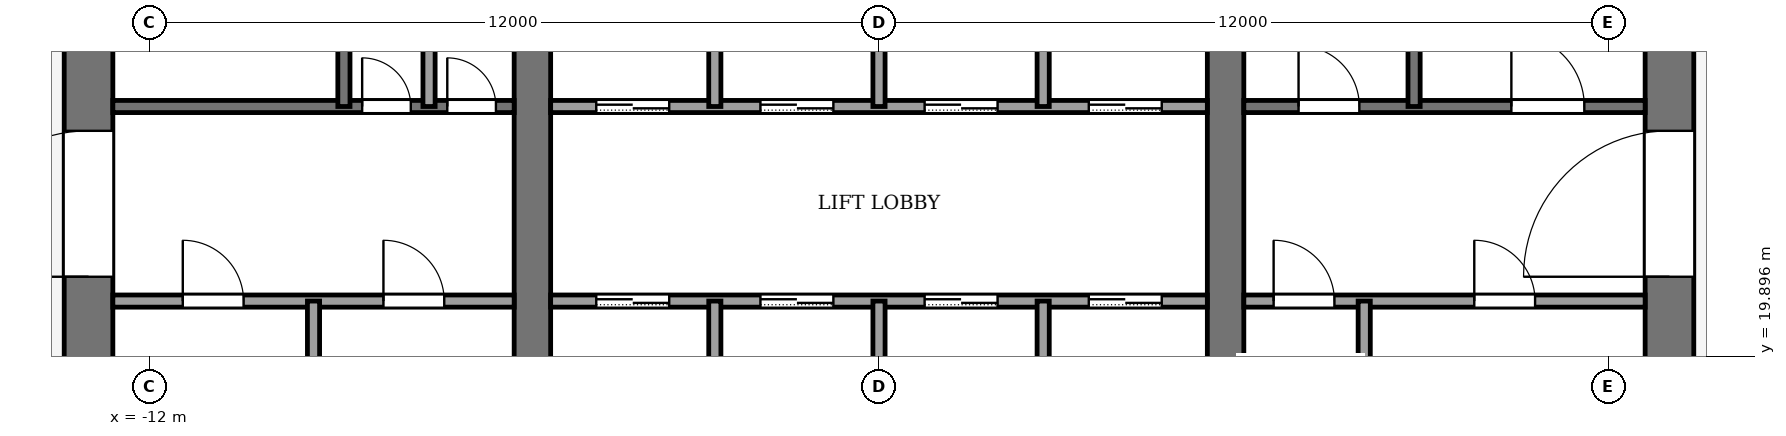
"""IFC4 building model, lengths in metres.
Left out: names, types, materials, properties, quantities, classifications, styles, units other than length and angle.
Written with IfcOpenShell. Run it as: python <this file> out.ifc"""

import sys

from ifc_helpers import new_model, si_unit, direction, frame, frame_2d, origin, place, context, subcontext, project, spatial, rectangle, extrude, element, fill, save


model = new_model("IFC4")
c1 = context("Model", 3, precision=1e-05, world=origin(), true_north=direction((0.0, 1.0)))
c2 = subcontext(c1, "Body", "Model", "MODEL_VIEW")
j1 = project(units=[si_unit("LENGTHUNIT", "METRE"), si_unit("PLANEANGLEUNIT", "RADIAN")], contexts=[c1])
p1 = place(None, origin())
s1 = spatial("IfcSite", under=j1, at=p1, CompositionType="ELEMENT")
p2 = place(p1, origin())
s2 = spatial("IfcBuilding", under=s1, at=p2, CompositionType="ELEMENT")
p3 = place(p2, frame((0.0, 0.0, 246.0)))
s3 = spatial("IfcBuildingStorey", under=s2, at=p3, CompositionType="ELEMENT", Elevation=246.0)
p4 = place(p3, frame((-13.0, 18.4, -0.13), z_axis=(0.0, 0.0, 1.0), x_axis=(0.0, 1.0, 0.0)))
e1 = element("IfcWall", 1, at=p4, inside=s3, PredefinedType="SHEAR", context=c2, shape_type="SweptSolid", body=[
    extrude(rectangle(XDim=19.2, YDim=0.8, at=frame_2d((9.6, 0.0))), origin(), (0.0, 0.0, 1.0), 4.0),
])
p5 = place(p4, frame((2.8, 0.0, 0.13)))
e2 = element("IfcOpeningElement", 2, at=p5, cuts=e1, PredefinedType="OPENING", context=c2, shape_type="SweptSolid", body=[
    extrude(rectangle(XDim=2.4, YDim=2.4, at=frame_2d((1.2, 1.2))), frame((0.0, 0.41, 0.0), z_axis=(0.0, -1.0, 0.0), x_axis=(1.0, 0.0, 0.0)), (0.0, 0.0, 1.0), 0.82),
])
p6 = place(p4, frame((13.4, 0.0, 0.13)))
e3 = element("IfcOpeningElement", 3, at=p6, cuts=e1, PredefinedType="OPENING", context=c2, shape_type="SweptSolid", body=[
    extrude(rectangle(XDim=1.4, YDim=2.2, at=frame_2d((0.7, 1.1))), frame((0.0, 0.41, 0.0), z_axis=(0.0, -1.0, 0.0), x_axis=(1.0, 0.0, 0.0)), (0.0, 0.0, 1.0), 0.82),
])
p7 = place(p3, frame((13.0, 18.4, -0.13), z_axis=(0.0, 0.0, 1.0), x_axis=(0.0, 1.0, 0.0)))
e4 = element("IfcWall", 4, at=p7, inside=s3, PredefinedType="SHEAR", context=c2, shape_type="SweptSolid", body=[
    extrude(rectangle(XDim=19.2, YDim=0.8, at=frame_2d((9.6, 0.0))), origin(), (0.0, 0.0, 1.0), 4.0),
])
p8 = place(p7, frame((2.8, 0.0, 0.13)))
e5 = element("IfcOpeningElement", 5, at=p8, cuts=e4, PredefinedType="OPENING", context=c2, shape_type="SweptSolid", body=[
    extrude(rectangle(XDim=2.4, YDim=2.4, at=frame_2d((1.2, 1.2))), frame((0.0, 0.41, 0.0), z_axis=(0.0, -1.0, 0.0), x_axis=(1.0, 0.0, 0.0)), (0.0, 0.0, 1.0), 0.82),
])
p9 = place(p7, frame((13.3, 0.0, 0.13)))
e6 = element("IfcOpeningElement", 6, at=p9, cuts=e4, PredefinedType="OPENING", context=c2, shape_type="SweptSolid", body=[
    extrude(rectangle(XDim=2.4, YDim=2.4, at=frame_2d((1.2, 1.2))), frame((0.0, 0.41, 0.0), z_axis=(0.0, -1.0, 0.0), x_axis=(1.0, 0.0, 0.0)), (0.0, 0.0, 1.0), 0.82),
])
p10 = place(p3, frame((-5.7, 18.4, -0.13), z_axis=(0.0, 0.0, 1.0), x_axis=(0.0, 1.0, 0.0)))
e7 = element("IfcWall", 7, at=p10, inside=s3, PredefinedType="SHEAR", context=c2, shape_type="SweptSolid", body=[
    extrude(rectangle(XDim=19.2, YDim=0.6, at=frame_2d((9.6, 0.0))), origin(), (0.0, 0.0, 1.0), 4.0),
])
p11 = place(p10, frame((8.35, 0.0, 0.13)))
e8 = element("IfcOpeningElement", 8, at=p11, cuts=e7, PredefinedType="OPENING", context=c2, shape_type="SweptSolid", body=[
    extrude(rectangle(XDim=0.9, YDim=2.1, at=frame_2d((0.45, 1.05))), frame((0.0, 0.31, 0.0), z_axis=(0.0, -1.0, 0.0), x_axis=(1.0, 0.0, 0.0)), (0.0, 0.0, 1.0), 0.62),
])
p12 = place(p3, frame((5.7, 18.4, -0.13), z_axis=(0.0, 0.0, 1.0), x_axis=(0.0, 1.0, 0.0)))
e9 = element("IfcWall", 9, at=p12, inside=s3, PredefinedType="SHEAR", context=c2, shape_type="SweptSolid", body=[
    extrude(rectangle(XDim=19.2, YDim=0.6, at=frame_2d((9.6, 0.0))), origin(), (0.0, 0.0, 1.0), 4.0),
])
p13 = place(p12, frame((8.35, 0.0, 0.13)))
e10 = element("IfcOpeningElement", 10, at=p13, cuts=e9, PredefinedType="OPENING", context=c2, shape_type="SweptSolid", body=[
    extrude(rectangle(XDim=0.9, YDim=2.1, at=frame_2d((0.45, 1.05))), frame((0.0, 0.31, 0.0), z_axis=(0.0, -1.0, 0.0), x_axis=(1.0, 0.0, 0.0)), (0.0, 0.0, 1.0), 0.62),
])
p14 = place(p12, frame((13.3, 0.0, 0.13)))
e11 = element("IfcOpeningElement", 11, at=p14, cuts=e9, PredefinedType="OPENING", context=c2, shape_type="SweptSolid", body=[
    extrude(rectangle(XDim=2.4, YDim=2.4, at=frame_2d((1.2, 1.2))), frame((0.0, 0.31, 0.0), z_axis=(0.0, -1.0, 0.0), x_axis=(1.0, 0.0, 0.0)), (0.0, 0.0, 1.0), 0.62),
])
p15 = place(p3, frame((-12.6, 20.8, 0.0), z_axis=(0.0, 0.0, 1.0), x_axis=(1.0, 0.0, 0.0)))
e12 = element("IfcWall", 12, at=p15, inside=s3, PredefinedType="PARTITIONING", context=c2, shape_type="SweptSolid", body=[
    extrude(rectangle(XDim=6.6, YDim=0.2, at=frame_2d((3.3, 0.0))), origin(), (0.0, 0.0, 1.0), 3.87),
])
p16 = place(p15, frame((1.15, 0.0, 0.0)))
e13 = element("IfcOpeningElement", 13, at=p16, cuts=e12, PredefinedType="OPENING", context=c2, shape_type="SweptSolid", body=[
    extrude(rectangle(XDim=1.0, YDim=2.1, at=frame_2d((0.5, 1.05))), frame((0.0, 0.11, 0.0), z_axis=(0.0, -1.0, 0.0), x_axis=(1.0, 0.0, 0.0)), (0.0, 0.0, 1.0), 0.22),
])
p17 = place(p15, frame((4.45, 0.0, 0.0)))
e14 = element("IfcOpeningElement", 14, at=p17, cuts=e12, PredefinedType="OPENING", context=c2, shape_type="SweptSolid", body=[
    extrude(rectangle(XDim=1.0, YDim=2.1, at=frame_2d((0.5, 1.05))), frame((0.0, 0.11, 0.0), z_axis=(0.0, -1.0, 0.0), x_axis=(1.0, 0.0, 0.0)), (0.0, 0.0, 1.0), 0.22),
])
p18 = place(p3, frame((-5.4, 20.8, 0.0), z_axis=(0.0, 0.0, 1.0), x_axis=(1.0, 0.0, 0.0)))
e15 = element("IfcWall", 15, at=p18, inside=s3, PredefinedType="PARTITIONING", context=c2, shape_type="SweptSolid", body=[
    extrude(rectangle(XDim=10.8, YDim=0.2, at=frame_2d((5.4, 0.0))), origin(), (0.0, 0.0, 1.0), 3.87),
])
p19 = place(p18, frame((0.75, 0.0, 0.0)))
e16 = element("IfcOpeningElement", 16, at=p19, cuts=e15, PredefinedType="OPENING", context=c2, shape_type="SweptSolid", body=[
    extrude(rectangle(XDim=1.2, YDim=2.2, at=frame_2d((0.6, 1.1))), frame((0.0, 0.11, 0.0), z_axis=(0.0, -1.0, 0.0), x_axis=(1.0, 0.0, 0.0)), (0.0, 0.0, 1.0), 0.22),
])
p20 = place(p18, frame((3.45, 0.0, 0.0)))
e17 = element("IfcOpeningElement", 17, at=p20, cuts=e15, PredefinedType="OPENING", context=c2, shape_type="SweptSolid", body=[
    extrude(rectangle(XDim=1.2, YDim=2.2, at=frame_2d((0.6, 1.1))), frame((0.0, 0.11, 0.0), z_axis=(0.0, -1.0, 0.0), x_axis=(1.0, 0.0, 0.0)), (0.0, 0.0, 1.0), 0.22),
])
p21 = place(p18, frame((6.15, 0.0, 0.0)))
e18 = element("IfcOpeningElement", 18, at=p21, cuts=e15, PredefinedType="OPENING", context=c2, shape_type="SweptSolid", body=[
    extrude(rectangle(XDim=1.2, YDim=2.2, at=frame_2d((0.6, 1.1))), frame((0.0, 0.11, 0.0), z_axis=(0.0, -1.0, 0.0), x_axis=(1.0, 0.0, 0.0)), (0.0, 0.0, 1.0), 0.22),
])
p22 = place(p18, frame((8.85, 0.0, 0.0)))
e19 = element("IfcOpeningElement", 19, at=p22, cuts=e15, PredefinedType="OPENING", context=c2, shape_type="SweptSolid", body=[
    extrude(rectangle(XDim=1.2, YDim=2.2, at=frame_2d((0.6, 1.1))), frame((0.0, 0.11, 0.0), z_axis=(0.0, -1.0, 0.0), x_axis=(1.0, 0.0, 0.0)), (0.0, 0.0, 1.0), 0.22),
])
p23 = place(p3, frame((6.0, 20.8, 0.0), z_axis=(0.0, 0.0, 1.0), x_axis=(1.0, 0.0, 0.0)))
e20 = element("IfcWall", 20, at=p23, inside=s3, PredefinedType="PARTITIONING", context=c2, shape_type="SweptSolid", body=[
    extrude(rectangle(XDim=6.6, YDim=0.2, at=frame_2d((3.3, 0.0))), origin(), (0.0, 0.0, 1.0), 3.87),
])
p24 = place(p23, frame((0.49, 0.0, 0.0)))
e21 = element("IfcOpeningElement", 21, at=p24, cuts=e20, PredefinedType="OPENING", context=c2, shape_type="SweptSolid", body=[
    extrude(rectangle(XDim=1.0, YDim=2.1, at=frame_2d((0.5, 1.05))), frame((0.0, 0.11, 0.0), z_axis=(0.0, -1.0, 0.0), x_axis=(1.0, 0.0, 0.0)), (0.0, 0.0, 1.0), 0.22),
])
p25 = place(p23, frame((3.79, 0.0, 0.0)))
e22 = element("IfcOpeningElement", 22, at=p25, cuts=e20, PredefinedType="OPENING", context=c2, shape_type="SweptSolid", body=[
    extrude(rectangle(XDim=1.0, YDim=2.1, at=frame_2d((0.5, 1.05))), frame((0.0, 0.11, 0.0), z_axis=(0.0, -1.0, 0.0), x_axis=(1.0, 0.0, 0.0)), (0.0, 0.0, 1.0), 0.22),
])
p26 = place(p3, frame((-12.6, 24.0, 0.0), z_axis=(0.0, 0.0, 1.0), x_axis=(1.0, 0.0, 0.0)))
e23 = element("IfcWall", 23, at=p26, inside=s3, PredefinedType="PARTITIONING", context=c2, shape_type="SweptSolid", body=[
    extrude(rectangle(XDim=6.6, YDim=0.2, at=frame_2d((3.3, 0.0))), origin(), (0.0, 0.0, 1.0), 3.87),
])
p27 = place(p26, frame((4.1, 0.0, 0.0)))
e24 = element("IfcOpeningElement", 24, at=p27, cuts=e23, PredefinedType="OPENING", context=c2, shape_type="SweptSolid", body=[
    extrude(rectangle(XDim=0.8, YDim=2.1, at=frame_2d((0.4, 1.05))), frame((0.0, 0.11, 0.0), z_axis=(0.0, -1.0, 0.0), x_axis=(1.0, 0.0, 0.0)), (0.0, 0.0, 1.0), 0.22),
])
p28 = place(p26, frame((5.5, 0.0, 0.0)))
e25 = element("IfcOpeningElement", 25, at=p28, cuts=e23, PredefinedType="OPENING", context=c2, shape_type="SweptSolid", body=[
    extrude(rectangle(XDim=0.8, YDim=2.1, at=frame_2d((0.4, 1.05))), frame((0.0, 0.11, 0.0), z_axis=(0.0, -1.0, 0.0), x_axis=(1.0, 0.0, 0.0)), (0.0, 0.0, 1.0), 0.22),
])
p29 = place(p3, frame((-5.4, 24.0, 0.0), z_axis=(0.0, 0.0, 1.0), x_axis=(1.0, 0.0, 0.0)))
e26 = element("IfcWall", 26, at=p29, inside=s3, PredefinedType="PARTITIONING", context=c2, shape_type="SweptSolid", body=[
    extrude(rectangle(XDim=10.8, YDim=0.2, at=frame_2d((5.4, 0.0))), origin(), (0.0, 0.0, 1.0), 3.87),
])
p30 = place(p29, frame((0.75, 0.0, 0.0)))
e27 = element("IfcOpeningElement", 27, at=p30, cuts=e26, PredefinedType="OPENING", context=c2, shape_type="SweptSolid", body=[
    extrude(rectangle(XDim=1.2, YDim=2.2, at=frame_2d((0.6, 1.1))), frame((0.0, 0.11, 0.0), z_axis=(0.0, -1.0, 0.0), x_axis=(1.0, 0.0, 0.0)), (0.0, 0.0, 1.0), 0.22),
])
p31 = place(p29, frame((3.45, 0.0, 0.0)))
e28 = element("IfcOpeningElement", 28, at=p31, cuts=e26, PredefinedType="OPENING", context=c2, shape_type="SweptSolid", body=[
    extrude(rectangle(XDim=1.2, YDim=2.2, at=frame_2d((0.6, 1.1))), frame((0.0, 0.11, 0.0), z_axis=(0.0, -1.0, 0.0), x_axis=(1.0, 0.0, 0.0)), (0.0, 0.0, 1.0), 0.22),
])
p32 = place(p29, frame((6.15, 0.0, 0.0)))
e29 = element("IfcOpeningElement", 29, at=p32, cuts=e26, PredefinedType="OPENING", context=c2, shape_type="SweptSolid", body=[
    extrude(rectangle(XDim=1.2, YDim=2.2, at=frame_2d((0.6, 1.1))), frame((0.0, 0.11, 0.0), z_axis=(0.0, -1.0, 0.0), x_axis=(1.0, 0.0, 0.0)), (0.0, 0.0, 1.0), 0.22),
])
p33 = place(p29, frame((8.85, 0.0, 0.0)))
e30 = element("IfcOpeningElement", 30, at=p33, cuts=e26, PredefinedType="OPENING", context=c2, shape_type="SweptSolid", body=[
    extrude(rectangle(XDim=1.2, YDim=2.2, at=frame_2d((0.6, 1.1))), frame((0.0, 0.11, 0.0), z_axis=(0.0, -1.0, 0.0), x_axis=(1.0, 0.0, 0.0)), (0.0, 0.0, 1.0), 0.22),
])
p34 = place(p3, frame((6.0, 24.0, 0.0), z_axis=(0.0, 0.0, 1.0), x_axis=(1.0, 0.0, 0.0)))
e31 = element("IfcWall", 31, at=p34, inside=s3, PredefinedType="PARTITIONING", context=c2, shape_type="SweptSolid", body=[
    extrude(rectangle(XDim=6.6, YDim=0.2, at=frame_2d((3.3, 0.0))), origin(), (0.0, 0.0, 1.0), 3.87),
])
p35 = place(p34, frame((0.9, 0.0, 0.0)))
e32 = element("IfcOpeningElement", 32, at=p35, cuts=e31, PredefinedType="OPENING", context=c2, shape_type="SweptSolid", body=[
    extrude(rectangle(XDim=1.0, YDim=2.1, at=frame_2d((0.5, 1.05))), frame((0.0, 0.11, 0.0), z_axis=(0.0, -1.0, 0.0), x_axis=(1.0, 0.0, 0.0)), (0.0, 0.0, 1.0), 0.22),
])
p36 = place(p34, frame((4.4, 0.0, 0.0)))
e33 = element("IfcOpeningElement", 33, at=p36, cuts=e31, PredefinedType="OPENING", context=c2, shape_type="SweptSolid", body=[
    extrude(rectangle(XDim=1.2, YDim=2.2, at=frame_2d((0.6, 1.1))), frame((0.0, 0.11, 0.0), z_axis=(0.0, -1.0, 0.0), x_axis=(1.0, 0.0, 0.0)), (0.0, 0.0, 1.0), 0.22),
])
p37 = place(p3, frame((-9.3, 18.4, 0.0), z_axis=(0.0, 0.0, 1.0), x_axis=(0.0, 1.0, 0.0)))
e34 = element("IfcWall", 34, at=p37, inside=s3, PredefinedType="PARTITIONING", context=c2, shape_type="SweptSolid", body=[
    extrude(rectangle(XDim=2.4, YDim=0.2, at=frame_2d((1.2, 0.0))), origin(), (0.0, 0.0, 1.0), 3.87),
])
for number, where, z_axis, x_axis in (
    (35, (-8.8, 24.0, 0.0), (0.0, 0.0, 1.0), (0.0, 1.0, 0.0)),
    (36, (-7.4, 24.0, 0.0), (0.0, 0.0, 1.0), (0.0, 1.0, 0.0)),
):
    element("IfcWall", number, at=place(p3, frame(where, z_axis=z_axis, x_axis=x_axis)), inside=s3, PredefinedType="PARTITIONING", context=c2, shape_type="SweptSolid", body=[
        extrude(rectangle(XDim=7.4, YDim=0.2, at=frame_2d((3.7, 0.0))), origin(), (0.0, 0.0, 1.0), 3.87),
    ])
p38 = place(p3, frame((-2.7, 18.4, 0.0), z_axis=(0.0, 0.0, 1.0), x_axis=(0.0, 1.0, 0.0)))
e37 = element("IfcWall", 37, at=p38, inside=s3, PredefinedType="PARTITIONING", context=c2, shape_type="SweptSolid", body=[
    extrude(rectangle(XDim=2.4, YDim=0.2, at=frame_2d((1.2, 0.0))), origin(), (0.0, 0.0, 1.0), 3.87),
])
p39 = place(p3, frame((-2.7, 24.0, 0.0), z_axis=(0.0, 0.0, 1.0), x_axis=(0.0, 1.0, 0.0)))
e38 = element("IfcWall", 38, at=p39, inside=s3, PredefinedType="PARTITIONING", context=c2, shape_type="SweptSolid", body=[
    extrude(rectangle(XDim=2.4, YDim=0.2, at=frame_2d((1.2, 0.0))), origin(), (0.0, 0.0, 1.0), 3.87),
])
p40 = place(p3, frame((0.0, 18.4, 0.0), z_axis=(0.0, 0.0, 1.0), x_axis=(0.0, 1.0, 0.0)))
e39 = element("IfcWall", 39, at=p40, inside=s3, PredefinedType="PARTITIONING", context=c2, shape_type="SweptSolid", body=[
    extrude(rectangle(XDim=2.4, YDim=0.2, at=frame_2d((1.2, 0.0))), origin(), (0.0, 0.0, 1.0), 3.87),
])
p41 = place(p3, frame((0.0, 24.0, 0.0), z_axis=(0.0, 0.0, 1.0), x_axis=(0.0, 1.0, 0.0)))
e40 = element("IfcWall", 40, at=p41, inside=s3, PredefinedType="PARTITIONING", context=c2, shape_type="SweptSolid", body=[
    extrude(rectangle(XDim=4.0, YDim=0.2, at=frame_2d((2.0, 0.0))), origin(), (0.0, 0.0, 1.0), 3.87),
])
p42 = place(p3, frame((2.7, 18.4, 0.0), z_axis=(0.0, 0.0, 1.0), x_axis=(0.0, 1.0, 0.0)))
e41 = element("IfcWall", 41, at=p42, inside=s3, PredefinedType="PARTITIONING", context=c2, shape_type="SweptSolid", body=[
    extrude(rectangle(XDim=2.4, YDim=0.2, at=frame_2d((1.2, 0.0))), origin(), (0.0, 0.0, 1.0), 3.87),
])
p43 = place(p3, frame((2.7, 24.0, 0.0), z_axis=(0.0, 0.0, 1.0), x_axis=(0.0, 1.0, 0.0)))
e42 = element("IfcWall", 42, at=p43, inside=s3, PredefinedType="PARTITIONING", context=c2, shape_type="SweptSolid", body=[
    extrude(rectangle(XDim=2.4, YDim=0.2, at=frame_2d((1.2, 0.0))), origin(), (0.0, 0.0, 1.0), 3.87),
])
p44 = place(p3, frame((7.98, 18.4, 0.0), z_axis=(0.0, 0.0, 1.0), x_axis=(0.0, 1.0, 0.0)))
e43 = element("IfcWall", 43, at=p44, inside=s3, PredefinedType="PARTITIONING", context=c2, shape_type="SweptSolid", body=[
    extrude(rectangle(XDim=2.4, YDim=0.2, at=frame_2d((1.2, 0.0))), origin(), (0.0, 0.0, 1.0), 3.87),
])
p45 = place(p3, frame((8.8, 24.0, 0.0), z_axis=(0.0, 0.0, 1.0), x_axis=(0.0, 1.0, 0.0)))
e44 = element("IfcWall", 44, at=p45, inside=s3, PredefinedType="PARTITIONING", context=c2, shape_type="SweptSolid", body=[
    extrude(rectangle(XDim=7.4, YDim=0.2, at=frame_2d((3.7, 0.0))), origin(), (0.0, 0.0, 1.0), 3.87),
])
p46 = place(p19, origin())
e45 = element("IfcDoor", 45, at=p46, inside=s3, OperationType="SLIDING_TO_LEFT", PredefinedType="DOOR", context=c2, shape_type="SweptSolid", body=[
    extrude(rectangle(XDim=1.2, YDim=2.2, at=frame_2d((0.6, 1.1))), frame((0.0, 0.025, 0.0), z_axis=(0.0, -1.0, 0.0), x_axis=(1.0, 0.0, 0.0)), (0.0, 0.0, 1.0), 0.05),
])
fill(e16, e45)
p47 = place(p20, origin())
e46 = element("IfcDoor", 46, at=p47, inside=s3, OperationType="SLIDING_TO_LEFT", PredefinedType="DOOR", context=c2, shape_type="SweptSolid", body=[
    extrude(rectangle(XDim=1.2, YDim=2.2, at=frame_2d((0.6, 1.1))), frame((0.0, 0.025, 0.0), z_axis=(0.0, -1.0, 0.0), x_axis=(1.0, 0.0, 0.0)), (0.0, 0.0, 1.0), 0.05),
])
fill(e17, e46)
p48 = place(p21, origin())
e47 = element("IfcDoor", 47, at=p48, inside=s3, OperationType="SLIDING_TO_LEFT", PredefinedType="DOOR", context=c2, shape_type="SweptSolid", body=[
    extrude(rectangle(XDim=1.2, YDim=2.2, at=frame_2d((0.6, 1.1))), frame((0.0, 0.025, 0.0), z_axis=(0.0, -1.0, 0.0), x_axis=(1.0, 0.0, 0.0)), (0.0, 0.0, 1.0), 0.05),
])
fill(e18, e47)
p49 = place(p22, origin())
e48 = element("IfcDoor", 48, at=p49, inside=s3, OperationType="SLIDING_TO_LEFT", PredefinedType="DOOR", context=c2, shape_type="SweptSolid", body=[
    extrude(rectangle(XDim=1.2, YDim=2.2, at=frame_2d((0.6, 1.1))), frame((0.0, 0.025, 0.0), z_axis=(0.0, -1.0, 0.0), x_axis=(1.0, 0.0, 0.0)), (0.0, 0.0, 1.0), 0.05),
])
fill(e19, e48)
p50 = place(p30, origin())
e49 = element("IfcDoor", 49, at=p50, inside=s3, OperationType="SLIDING_TO_LEFT", PredefinedType="DOOR", context=c2, shape_type="SweptSolid", body=[
    extrude(rectangle(XDim=1.2, YDim=2.2, at=frame_2d((0.6, 1.1))), frame((0.0, 0.025, 0.0), z_axis=(0.0, -1.0, 0.0), x_axis=(1.0, 0.0, 0.0)), (0.0, 0.0, 1.0), 0.05),
])
fill(e27, e49)
p51 = place(p31, origin())
e50 = element("IfcDoor", 50, at=p51, inside=s3, OperationType="SLIDING_TO_LEFT", PredefinedType="DOOR", context=c2, shape_type="SweptSolid", body=[
    extrude(rectangle(XDim=1.2, YDim=2.2, at=frame_2d((0.6, 1.1))), frame((0.0, 0.025, 0.0), z_axis=(0.0, -1.0, 0.0), x_axis=(1.0, 0.0, 0.0)), (0.0, 0.0, 1.0), 0.05),
])
fill(e28, e50)
p52 = place(p32, origin())
e51 = element("IfcDoor", 51, at=p52, inside=s3, OperationType="SLIDING_TO_LEFT", PredefinedType="DOOR", context=c2, shape_type="SweptSolid", body=[
    extrude(rectangle(XDim=1.2, YDim=2.2, at=frame_2d((0.6, 1.1))), frame((0.0, 0.025, 0.0), z_axis=(0.0, -1.0, 0.0), x_axis=(1.0, 0.0, 0.0)), (0.0, 0.0, 1.0), 0.05),
])
fill(e29, e51)
p53 = place(p33, origin())
e52 = element("IfcDoor", 52, at=p53, inside=s3, OperationType="SLIDING_TO_LEFT", PredefinedType="DOOR", context=c2, shape_type="SweptSolid", body=[
    extrude(rectangle(XDim=1.2, YDim=2.2, at=frame_2d((0.6, 1.1))), frame((0.0, 0.025, 0.0), z_axis=(0.0, -1.0, 0.0), x_axis=(1.0, 0.0, 0.0)), (0.0, 0.0, 1.0), 0.05),
])
fill(e30, e52)
p54 = place(p16, origin())
e53 = element("IfcDoor", 53, at=p54, inside=s3, OperationType="SINGLE_SWING_LEFT", PredefinedType="DOOR", context=c2, shape_type="SweptSolid", body=[
    extrude(rectangle(XDim=1.0, YDim=2.1, at=frame_2d((0.5, 1.05))), frame((0.0, 0.025, 0.0), z_axis=(0.0, -1.0, 0.0), x_axis=(1.0, 0.0, 0.0)), (0.0, 0.0, 1.0), 0.05),
])
fill(e13, e53)
p55 = place(p17, origin())
e54 = element("IfcDoor", 54, at=p55, inside=s3, OperationType="SINGLE_SWING_LEFT", PredefinedType="DOOR", context=c2, shape_type="SweptSolid", body=[
    extrude(rectangle(XDim=1.0, YDim=2.1, at=frame_2d((0.5, 1.05))), frame((0.0, 0.025, 0.0), z_axis=(0.0, -1.0, 0.0), x_axis=(1.0, 0.0, 0.0)), (0.0, 0.0, 1.0), 0.05),
])
fill(e14, e54)
p56 = place(p24, origin())
e55 = element("IfcDoor", 55, at=p56, inside=s3, OperationType="SINGLE_SWING_RIGHT", PredefinedType="DOOR", context=c2, shape_type="SweptSolid", body=[
    extrude(rectangle(XDim=1.0, YDim=2.1, at=frame_2d((0.5, 1.05))), frame((0.0, 0.025, 0.0), z_axis=(0.0, -1.0, 0.0), x_axis=(1.0, 0.0, 0.0)), (0.0, 0.0, 1.0), 0.05),
])
fill(e21, e55)
p57 = place(p25, origin())
e56 = element("IfcDoor", 56, at=p57, inside=s3, OperationType="SINGLE_SWING_RIGHT", PredefinedType="DOOR", context=c2, shape_type="SweptSolid", body=[
    extrude(rectangle(XDim=1.0, YDim=2.1, at=frame_2d((0.5, 1.05))), frame((0.0, 0.025, 0.0), z_axis=(0.0, -1.0, 0.0), x_axis=(1.0, 0.0, 0.0)), (0.0, 0.0, 1.0), 0.05),
])
fill(e22, e56)
p58 = place(p27, origin())
e57 = element("IfcDoor", 57, at=p58, inside=s3, OperationType="SINGLE_SWING_LEFT", PredefinedType="DOOR", context=c2, shape_type="SweptSolid", body=[
    extrude(rectangle(XDim=0.8, YDim=2.1, at=frame_2d((0.4, 1.05))), frame((0.0, 0.025, 0.0), z_axis=(0.0, -1.0, 0.0), x_axis=(1.0, 0.0, 0.0)), (0.0, 0.0, 1.0), 0.05),
])
fill(e24, e57)
p59 = place(p28, origin())
e58 = element("IfcDoor", 58, at=p59, inside=s3, OperationType="SINGLE_SWING_RIGHT", PredefinedType="DOOR", context=c2, shape_type="SweptSolid", body=[
    extrude(rectangle(XDim=0.8, YDim=2.1, at=frame_2d((0.4, 1.05))), frame((0.0, 0.025, 0.0), z_axis=(0.0, -1.0, 0.0), x_axis=(1.0, 0.0, 0.0)), (0.0, 0.0, 1.0), 0.05),
])
fill(e25, e58)
p60 = place(p35, origin())
e59 = element("IfcDoor", 59, at=p60, inside=s3, OperationType="SINGLE_SWING_RIGHT", PredefinedType="DOOR", context=c2, shape_type="SweptSolid", body=[
    extrude(rectangle(XDim=1.0, YDim=2.1, at=frame_2d((0.5, 1.05))), frame((0.0, 0.025, 0.0), z_axis=(0.0, -1.0, 0.0), x_axis=(1.0, 0.0, 0.0)), (0.0, 0.0, 1.0), 0.05),
])
fill(e32, e59)
p61 = place(p36, origin())
e60 = element("IfcDoor", 60, at=p61, inside=s3, OperationType="SINGLE_SWING_LEFT", PredefinedType="DOOR", context=c2, shape_type="SweptSolid", body=[
    extrude(rectangle(XDim=1.2, YDim=2.2, at=frame_2d((0.6, 1.1))), frame((0.0, 0.025, 0.0), z_axis=(0.0, -1.0, 0.0), x_axis=(1.0, 0.0, 0.0)), (0.0, 0.0, 1.0), 0.05),
])
fill(e33, e60)
p62 = place(p5, origin())
e61 = element("IfcDoor", 61, at=p62, inside=s3, OperationType="DOUBLE_DOOR_SINGLE_SWING", PredefinedType="DOOR", context=c2, shape_type="SweptSolid", body=[
    extrude(rectangle(XDim=2.4, YDim=2.4, at=frame_2d((1.2, 1.2))), frame((0.0, 0.025, 0.0), z_axis=(0.0, -1.0, 0.0), x_axis=(1.0, 0.0, 0.0)), (0.0, 0.0, 1.0), 0.05),
])
fill(e2, e61)
p63 = place(p8, origin())
e62 = element("IfcDoor", 62, at=p63, inside=s3, OperationType="DOUBLE_DOOR_SINGLE_SWING", PredefinedType="DOOR", context=c2, shape_type="SweptSolid", body=[
    extrude(rectangle(XDim=2.4, YDim=2.4, at=frame_2d((1.2, 1.2))), frame((0.0, 0.025, 0.0), z_axis=(0.0, -1.0, 0.0), x_axis=(1.0, 0.0, 0.0)), (0.0, 0.0, 1.0), 0.05),
])
fill(e5, e62)
save(model, sys.argv[1])
